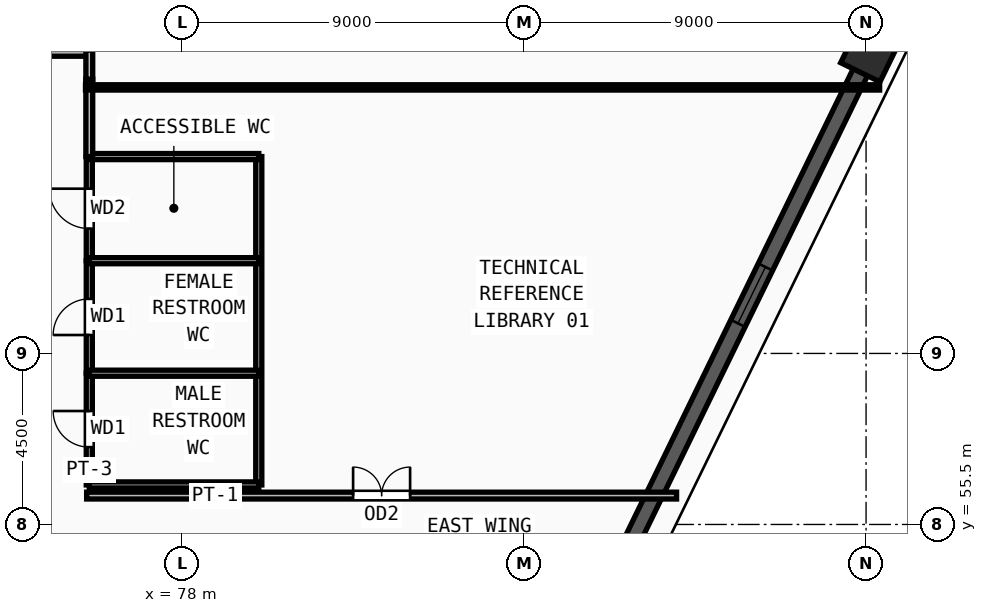
"""IFC4 building model, lengths in metres.
Left out: names, types, materials, properties, quantities, classifications, styles, units other than length and angle.
Written with IfcOpenShell. Run it as: python <this file> out.ifc"""

import sys

from ifc_helpers import new_model, si_unit, direction, frame, frame_2d, origin, origin_2d, place, context, subcontext, project, spatial, rectangle, extrude, source, transform, mapped, element, fill, save


model = new_model("IFC4")
c1 = context("Model", 3, precision=1e-05, world=origin(), true_north=direction((0.0, 1.0)))
c2 = subcontext(c1, "Body", "Model", "MODEL_VIEW")
j1 = project(units=[si_unit("LENGTHUNIT", "METRE"), si_unit("PLANEANGLEUNIT", "RADIAN")], contexts=[c1])
p1 = place(None, origin())
s1 = spatial("IfcSite", under=j1, at=p1, CompositionType="ELEMENT")
p2 = place(p1, origin())
s2 = spatial("IfcBuilding", under=s1, at=p2, CompositionType="ELEMENT")
p3 = place(p2, frame((0.0, 0.0, 124.5)))
s3 = spatial("IfcBuildingStorey", under=s2, at=p3, CompositionType="ELEMENT", Elevation=124.5)
m1 = source(origin(), c2, "Body", "SweptSolid", [
    extrude(rectangle(XDim=1.4, YDim=1.15, at=origin_2d()), origin(), (0.0, 0.0, 1.0), 3.75),
])
p4 = place(p3, frame((96.156, 68.027, 0.0), z_axis=(0.0, 0.0, 1.0), x_axis=(0.438214270959, 0.898870542808, 0.0)))
e1 = element("IfcColumn", 1, at=p4, inside=s3, PredefinedType="COLUMN", context=c2, shape_type="MappedRepresentation", body=[
    mapped(m1, transform((0.0, 0.0, 0.0), x_axis=(1.0, 0.0, 0.0), y_axis=(0.0, 1.0, 0.0), z_axis=(0.0, 0.0, 1.0), scale=1.0)),
])
p5 = place(p3, frame((84.401, 43.91, 0.0), z_axis=(0.0, 0.0, 1.0), x_axis=(0.438149799109, 0.898901971041, 0.0)))
e2 = element("IfcWall", 2, at=p5, inside=s3, PredefinedType="SOLIDWALL", context=c2, shape_type="SweptSolid", body=[
    extrude(rectangle(XDim=26.14, YDim=0.42, at=frame_2d((13.07, 0.0))), origin(), (0.0, 0.0, 1.0), 3.57),
])
m2 = source(origin(), c2, "Body", "SweptSolid", [
    extrude(rectangle(XDim=1.65, YDim=1.95, at=frame_2d((0.825, 0.975))), frame((0.0, 0.22, 0.0), z_axis=(0.0, -1.0, 0.0), x_axis=(1.0, 0.0, 0.0)), (0.0, 0.0, 1.0), 0.44),
])
p6 = place(p5, frame((5.71, 0.0, 0.55)))
e3 = element("IfcOpeningElement", 3, at=p6, cuts=e2, PredefinedType="OPENING", context=c2, shape_type="MappedRepresentation", body=[
    mapped(m2, transform((0.0, 0.0, 0.0), x_axis=(1.0, 0.0, 0.0), y_axis=(0.0, 1.0, 0.0), z_axis=(0.0, 0.0, 1.0), scale=1.0)),
])
p7 = place(p5, frame((18.78, 0.0, 0.55)))
e4 = element("IfcOpeningElement", 4, at=p7, cuts=e2, PredefinedType="OPENING", context=c2, shape_type="MappedRepresentation", body=[
    mapped(m2, transform((0.0, 0.0, 0.0), x_axis=(1.0, 0.0, 0.0), y_axis=(0.0, 1.0, 0.0), z_axis=(0.0, 0.0, 1.0), scale=1.0)),
])
p8 = place(p3, frame((75.56, 56.54, 0.0), z_axis=(0.0, 0.0, 1.0), x_axis=(0.0, 1.0, 0.0)))
e5 = element("IfcWall", 5, at=p8, inside=s3, PredefinedType="PARTITIONING", context=c2, shape_type="SweptSolid", body=[
    extrude(rectangle(XDim=2.94, YDim=0.16, at=frame_2d((1.47, 0.0))), origin(), (0.0, 0.0, 1.0), 3.57),
])
m3 = source(origin(), c2, "Body", "SweptSolid", [
    extrude(rectangle(XDim=0.95, YDim=2.15, at=frame_2d((0.475, 1.075))), frame((0.0, 0.09, 0.0), z_axis=(0.0, -1.0, 0.0), x_axis=(1.0, 0.0, 0.0)), (0.0, 0.0, 1.0), 0.18),
])
p9 = place(p8, frame((0.995, 0.0, 0.0)))
e6 = element("IfcOpeningElement", 6, at=p9, cuts=e5, PredefinedType="OPENING", context=c2, shape_type="MappedRepresentation", body=[
    mapped(m3, transform((0.0, 0.0, 0.0), x_axis=(1.0, 0.0, 0.0), y_axis=(0.0, 1.0, 0.0), z_axis=(0.0, 0.0, 1.0), scale=1.0)),
])
p10 = place(p3, frame((75.56, 59.48, 0.0), z_axis=(0.0, 0.0, 1.0), x_axis=(0.0, 1.0, 0.0)))
e7 = element("IfcWall", 7, at=p10, inside=s3, PredefinedType="PARTITIONING", context=c2, shape_type="SweptSolid", body=[
    extrude(rectangle(XDim=2.96, YDim=0.16, at=frame_2d((1.48, 0.0))), origin(), (0.0, 0.0, 1.0), 3.57),
])
p11 = place(p10, frame((1.005, 0.0, 0.0)))
e8 = element("IfcOpeningElement", 8, at=p11, cuts=e7, PredefinedType="OPENING", context=c2, shape_type="MappedRepresentation", body=[
    mapped(m3, transform((0.0, 0.0, 0.0), x_axis=(1.0, 0.0, 0.0), y_axis=(0.0, 1.0, 0.0), z_axis=(0.0, 0.0, 1.0), scale=1.0)),
])
p12 = place(p3, frame((75.56, 62.44, 0.0), z_axis=(0.0, 0.0, 1.0), x_axis=(0.0, 1.0, 0.0)))
e9 = element("IfcWall", 9, at=p12, inside=s3, PredefinedType="PARTITIONING", context=c2, shape_type="SweptSolid", body=[
    extrude(rectangle(XDim=2.74, YDim=0.16, at=frame_2d((1.37, 0.0))), origin(), (0.0, 0.0, 1.0), 3.57),
])
m4 = source(origin(), c2, "Body", "SweptSolid", [
    extrude(rectangle(XDim=1.05, YDim=2.15, at=frame_2d((0.525, 1.075))), frame((0.0, 0.09, 0.0), z_axis=(0.0, -1.0, 0.0), x_axis=(1.0, 0.0, 0.0)), (0.0, 0.0, 1.0), 0.18),
])
p13 = place(p12, frame((0.845, 0.0, 0.0)))
e10 = element("IfcOpeningElement", 10, at=p13, cuts=e9, PredefinedType="OPENING", context=c2, shape_type="MappedRepresentation", body=[
    mapped(m4, transform((0.0, 0.0, 0.0), x_axis=(1.0, 0.0, 0.0), y_axis=(0.0, 1.0, 0.0), z_axis=(0.0, 0.0, 1.0), scale=1.0)),
])
p14 = place(p3, frame((75.49, 56.26, 0.0), z_axis=(0.0, 0.0, 1.0), x_axis=(1.0, 0.0, 0.0)))
e11 = element("IfcWall", 11, at=p14, inside=s3, PredefinedType="PARTITIONING", context=c2, shape_type="SweptSolid", body=[
    extrude(rectangle(XDim=15.524, YDim=0.18, at=frame_2d((7.762, 0.0))), origin(), (0.0, 0.0, 1.0), 3.57),
])
m5 = source(origin(), c2, "Body", "SweptSolid", [
    extrude(rectangle(XDim=1.5, YDim=2.2, at=frame_2d((0.75, 1.1))), frame((0.0, 0.1, 0.0), z_axis=(0.0, -1.0, 0.0), x_axis=(1.0, 0.0, 0.0)), (0.0, 0.0, 1.0), 0.2),
])
p15 = place(p14, frame((7.012, 0.0, 0.0)))
e12 = element("IfcOpeningElement", 12, at=p15, cuts=e11, PredefinedType="OPENING", context=c2, shape_type="MappedRepresentation", body=[
    mapped(m5, transform((0.0, 0.0, 0.0), x_axis=(1.0, 0.0, 0.0), y_axis=(0.0, 1.0, 0.0), z_axis=(0.0, 0.0, 1.0), scale=1.0)),
])
p16 = place(p3, frame((69.285, 67.91, 0.0), z_axis=(0.0, 0.0, 1.0), x_axis=(1.0, 0.0, 0.0)))
e13 = element("IfcWall", 13, at=p16, inside=s3, PredefinedType="PARTITIONING", context=c2, shape_type="SweptSolid", body=[
    extrude(rectangle(XDim=6.345, YDim=0.18, at=frame_2d((3.172, 0.0))), origin(), (0.0, 0.0, 1.0), 3.57),
])
p17 = place(p16, frame((2.422, 0.0, 0.0)))
e14 = element("IfcOpeningElement", 14, at=p17, cuts=e13, PredefinedType="OPENING", context=c2, shape_type="MappedRepresentation", body=[
    mapped(m5, transform((0.0, 0.0, 0.0), x_axis=(1.0, 0.0, 0.0), y_axis=(0.0, 1.0, 0.0), z_axis=(0.0, 0.0, 1.0), scale=1.0)),
])
p18 = place(p3, frame((80.02, 56.54, 0.0), z_axis=(0.0, 0.0, 1.0), x_axis=(0.0, 1.0, 0.0)))
e15 = element("IfcWall", 15, at=p18, inside=s3, PredefinedType="PARTITIONING", context=c2, shape_type="SweptSolid", body=[
    extrude(rectangle(XDim=8.64, YDim=0.16, at=frame_2d((4.32, 0.0))), origin(), (0.0, 0.0, 1.0), 3.155),
])
for number, where, z_axis, x_axis in (
    (16, (75.56, 56.54, 0.0), (0.0, 0.0, 1.0), (1.0, 0.0, 0.0)),
    (17, (75.56, 59.48, 0.0), (0.0, 0.0, 1.0), (1.0, 0.0, 0.0)),
    (18, (75.56, 62.44, 0.0), (0.0, 0.0, 1.0), (1.0, 0.0, 0.0)),
    (19, (75.56, 65.18, 0.0), (0.0, 0.0, 1.0), (1.0, 0.0, 0.0)),
):
    element("IfcWall", number, at=place(p3, frame(where, z_axis=z_axis, x_axis=x_axis)), inside=s3, PredefinedType="PARTITIONING", context=c2, shape_type="SweptSolid", body=[
        extrude(rectangle(XDim=4.46, YDim=0.16, at=frame_2d((2.23, 0.0))), origin(), (0.0, 0.0, 1.0), 3.57),
    ])
p19 = place(p3, frame((75.56, 67.215, 0.0), z_axis=(0.0, 0.0, 1.0), x_axis=(0.0, -1.0, 0.0)))
e20 = element("IfcWall", 20, at=p19, inside=s3, PredefinedType="PARTITIONING", context=c2, shape_type="SweptSolid", body=[
    extrude(rectangle(XDim=2.035, YDim=0.18, at=frame_2d((1.018, 0.0))), origin(), (0.0, 0.0, 1.0), 3.57),
])
p20 = place(p3, frame((75.56, 67.98, 0.0), z_axis=(0.0, 0.0, 1.0), x_axis=(0.0, -1.0, 0.0)))
e21 = element("IfcWall", 21, at=p20, inside=s3, PredefinedType="PARTITIONING", context=c2, shape_type="SweptSolid", body=[
    extrude(rectangle(XDim=0.765, YDim=0.18, at=frame_2d((0.382, 0.0))), origin(), (0.0, 0.0, 1.0), 3.57),
])
p21 = place(p3, frame((75.46, 67.0, 0.0), z_axis=(0.0, 0.0, 1.0), x_axis=(1.0, 0.0, 0.0)))
e22 = element("IfcWall", 22, at=p21, inside=s3, PredefinedType="PARTITIONING", context=c2, shape_type="SweptSolid", body=[
    extrude(rectangle(XDim=20.897, YDim=0.14, at=frame_2d((10.448, 0.0))), origin(), (0.0, 0.0, 1.0), 2.755),
])
m6 = source(origin(), c2, "Body", "SweptSolid", [
    extrude(rectangle(XDim=1.65, YDim=1.95, at=frame_2d((0.825, 0.975))), frame((0.0, 0.03, 0.0), z_axis=(0.0, -1.0, 0.0), x_axis=(1.0, 0.0, 0.0)), (0.0, 0.0, 1.0), 0.06),
])
p22 = place(p7, origin())
e23 = element("IfcWindow", 23, at=p22, inside=s3, PartitioningType="DOUBLE_PANEL_VERTICAL", PredefinedType="WINDOW", context=c2, shape_type="MappedRepresentation", body=[
    mapped(m6, transform((0.0, 0.0, 0.0), x_axis=(1.0, 0.0, 0.0), y_axis=(0.0, 1.0, 0.0), z_axis=(0.0, 0.0, 1.0), scale=1.0)),
])
fill(e4, e23)
m7 = source(origin(), c2, "Body", "SweptSolid", [
    extrude(rectangle(XDim=0.95, YDim=2.15, at=frame_2d((0.475, 1.075))), frame((0.0, 0.025, 0.0), z_axis=(0.0, -1.0, 0.0), x_axis=(1.0, 0.0, 0.0)), (0.0, 0.0, 1.0), 0.05),
])
p23 = place(p9, origin())
e24 = element("IfcDoor", 24, at=p23, inside=s3, OperationType="SINGLE_SWING_RIGHT", PredefinedType="DOOR", context=c2, shape_type="MappedRepresentation", body=[
    mapped(m7, transform((0.0, 0.0, 0.0), x_axis=(1.0, 0.0, 0.0), y_axis=(0.0, 1.0, 0.0), z_axis=(0.0, 0.0, 1.0), scale=1.0)),
])
fill(e6, e24)
p24 = place(p11, origin())
e25 = element("IfcDoor", 25, at=p24, inside=s3, OperationType="SINGLE_SWING_LEFT", PredefinedType="DOOR", context=c2, shape_type="MappedRepresentation", body=[
    mapped(m7, transform((0.0, 0.0, 0.0), x_axis=(1.0, 0.0, 0.0), y_axis=(0.0, 1.0, 0.0), z_axis=(0.0, 0.0, 1.0), scale=1.0)),
])
fill(e8, e25)
m8 = source(origin(), c2, "Body", "SweptSolid", [
    extrude(rectangle(XDim=1.05, YDim=2.15, at=frame_2d((0.525, 1.075))), frame((0.0, 0.025, 0.0), z_axis=(0.0, -1.0, 0.0), x_axis=(1.0, 0.0, 0.0)), (0.0, 0.0, 1.0), 0.05),
])
p25 = place(p13, origin())
e26 = element("IfcDoor", 26, at=p25, inside=s3, OperationType="SINGLE_SWING_RIGHT", PredefinedType="DOOR", context=c2, shape_type="MappedRepresentation", body=[
    mapped(m8, transform((0.0, 0.0, 0.0), x_axis=(1.0, 0.0, 0.0), y_axis=(0.0, 1.0, 0.0), z_axis=(0.0, 0.0, 1.0), scale=1.0)),
])
fill(e10, e26)
m9 = source(origin(), c2, "Body", "SweptSolid", [
    extrude(rectangle(XDim=1.5, YDim=2.2, at=frame_2d((0.75, 1.1))), frame((0.0, 0.025, 0.0), z_axis=(0.0, -1.0, 0.0), x_axis=(1.0, 0.0, 0.0)), (0.0, 0.0, 1.0), 0.05),
])
p26 = place(p15, origin())
e27 = element("IfcDoor", 27, at=p26, inside=s3, OperationType="DOUBLE_DOOR_SINGLE_SWING", PredefinedType="DOOR", context=c2, shape_type="MappedRepresentation", body=[
    mapped(m9, transform((0.0, 0.0, 0.0), x_axis=(1.0, 0.0, 0.0), y_axis=(0.0, 1.0, 0.0), z_axis=(0.0, 0.0, 1.0), scale=1.0)),
])
fill(e12, e27)
save(model, sys.argv[1])
